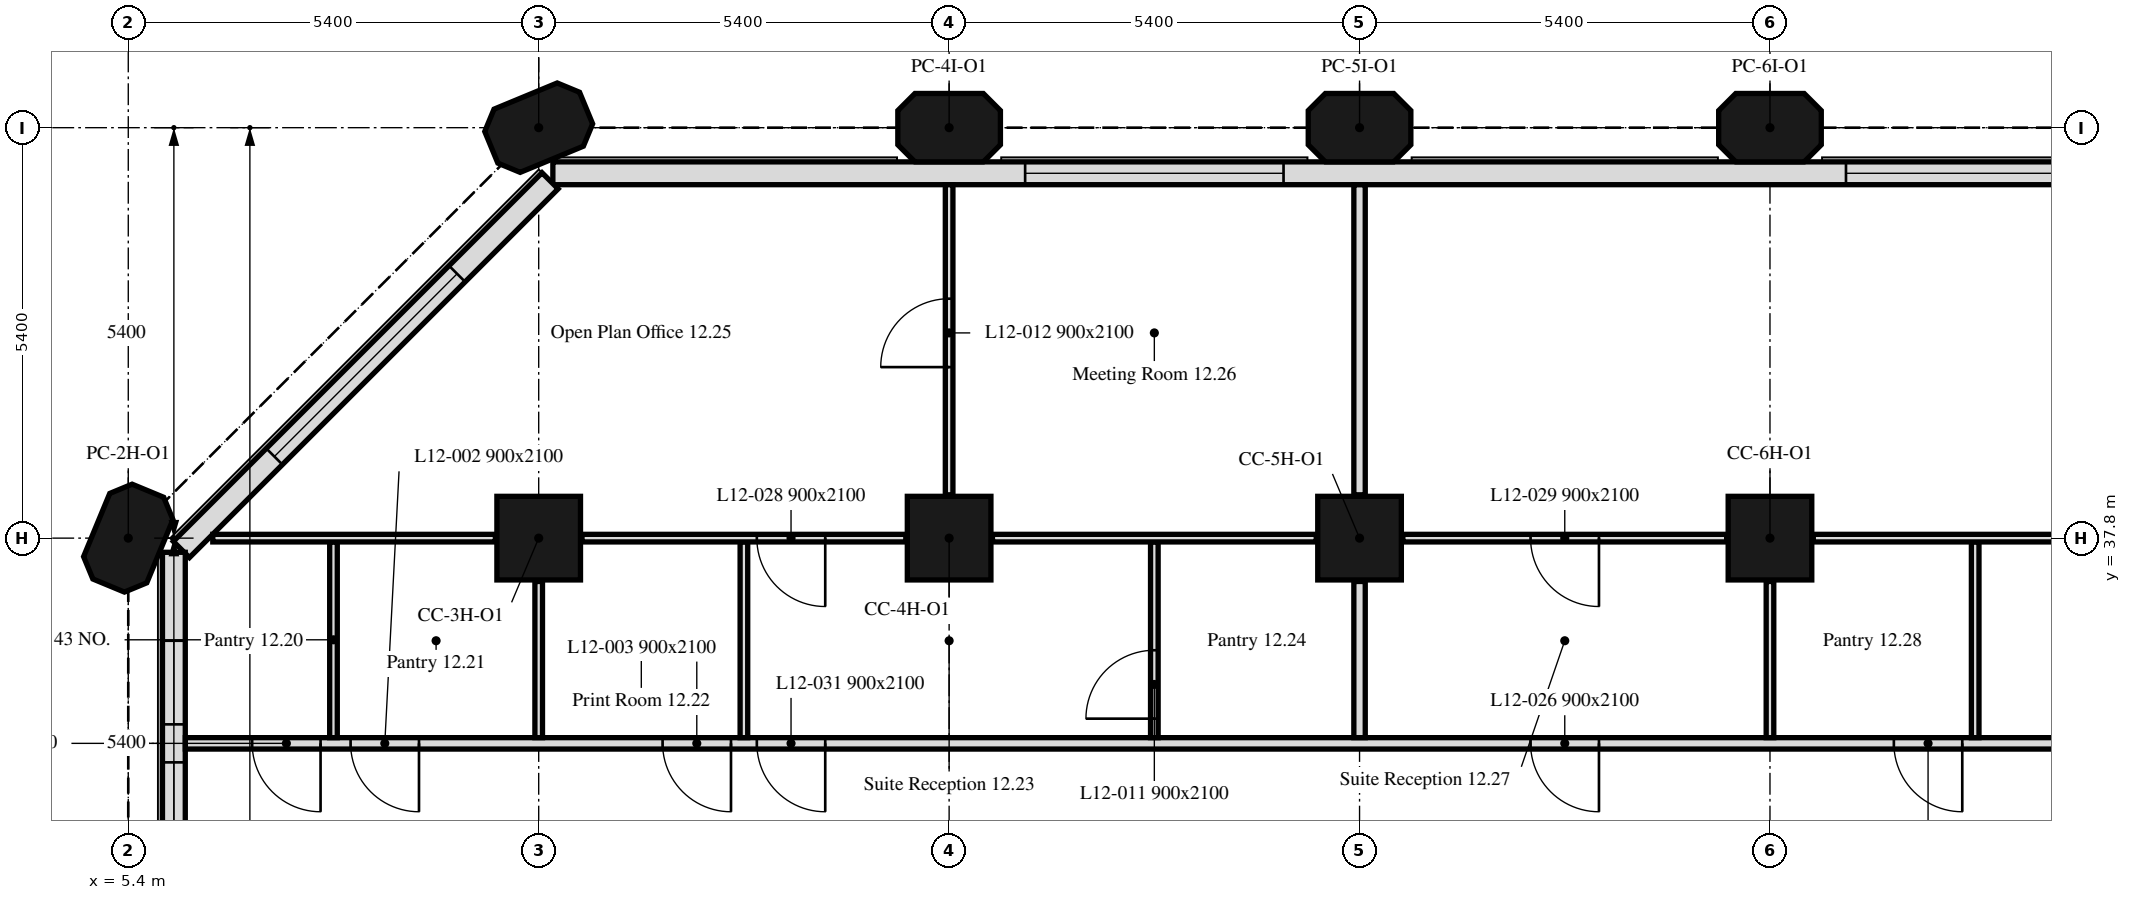
"""IFC4 building model, lengths in metres.
Left out: names, types, materials, properties, quantities, classifications, styles, units other than length and angle.
Written with IfcOpenShell. Run it as: python <this file> out.ifc"""

import sys

from ifc_helpers import new_model, si_unit, direction, frame, frame_2d, origin, origin_2d, place, context, subcontext, project, spatial, polyline, rectangle, outline, extrude, element, fill, save


model = new_model("IFC4")
c1 = context("Model", 3, precision=1e-05, world=origin(), true_north=direction((0.0, 1.0)))
c2 = subcontext(c1, "Body", "Model", "MODEL_VIEW")
j1 = project(units=[si_unit("LENGTHUNIT", "METRE"), si_unit("PLANEANGLEUNIT", "RADIAN")], contexts=[c1])
p1 = place(None, origin())
s1 = spatial("IfcSite", under=j1, at=p1, CompositionType="ELEMENT")
p2 = place(p1, origin())
s2 = spatial("IfcBuilding", under=s1, at=p2, CompositionType="ELEMENT")
p3 = place(p2, frame((0.0, 0.0, 56.4)))
s3 = spatial("IfcBuildingStorey", under=s2, at=p3, CompositionType="ELEMENT", Elevation=56.4)
p4 = place(p3, frame((5.4, 37.8, 0.0), z_axis=(0.0, 0.0, 1.0), x_axis=(0.382683432365, 0.923879532511, 0.0)))
e1 = element("IfcColumn", 1, at=p4, inside=s3, PredefinedType="COLUMN", context=c2, shape_type="SweptSolid", body=[
    extrude(outline(polyline([(-0.45, -0.45), (0.45, -0.45), (0.675, -0.225), (0.675, 0.225), (0.45, 0.45), (-0.45, 0.45), (-0.675, 0.225), (-0.675, -0.225), (-0.45, -0.45)])), origin(), (0.0, 0.0, 1.0), 3.3),
])
for number, where, z_axis, x_axis in (
    (2, (10.8, 37.8, 0.0), (0.0, 0.0, 1.0), (1.0, 0.0, 0.0)),
    (3, (16.2, 37.8, 0.0), (0.0, 0.0, 1.0), (1.0, 0.0, 0.0)),
    (4, (21.6, 37.8, 0.0), (0.0, 0.0, 1.0), (1.0, 0.0, 0.0)),
    (5, (27.0, 37.8, 0.0), (0.0, 0.0, 1.0), (1.0, 0.0, 0.0)),
):
    element("IfcColumn", number, at=place(p3, frame(where, z_axis=z_axis, x_axis=x_axis)), inside=s3, PredefinedType="COLUMN", context=c2, shape_type="SweptSolid", body=[
        extrude(rectangle(XDim=1.1, YDim=1.1, at=origin_2d()), origin(), (0.0, 0.0, 1.0), 3.3),
    ])
for number, where, z_axis, x_axis in (
    (6, (10.8, 43.2, 0.0), (0.0, 0.0, 1.0), (0.924, 0.383, 0.0)),
    (7, (16.2, 43.2, 0.0), (0.0, 0.0, 1.0), (1.0, 0.0, 0.0)),
    (8, (21.6, 43.2, 0.0), (0.0, 0.0, 1.0), (1.0, 0.0, 0.0)),
    (9, (27.0, 43.2, 0.0), (0.0, 0.0, 1.0), (1.0, 0.0, 0.0)),
):
    element("IfcColumn", number, at=place(p3, frame(where, z_axis=z_axis, x_axis=x_axis)), inside=s3, PredefinedType="COLUMN", context=c2, shape_type="SweptSolid", body=[
        extrude(outline(polyline([(-0.45, -0.45), (0.45, -0.45), (0.675, -0.225), (0.675, 0.225), (0.45, 0.45), (-0.45, 0.45), (-0.675, 0.225), (-0.675, -0.225), (-0.45, -0.45)])), origin(), (0.0, 0.0, 1.0), 3.3),
    ])
p5 = place(p3, frame((43.014, 42.6, 0.0), z_axis=(0.0, 0.0, 1.0), x_axis=(-1.0, 0.0, 0.0)))
e10 = element("IfcWall", 10, at=p5, inside=s3, PredefinedType="SOLIDWALL", context=c2, shape_type="SweptSolid", body=[
    extrude(rectangle(XDim=32.027, YDim=0.3, at=frame_2d((16.014, 0.0))), origin(), (0.0, 0.0, 1.0), 3.3),
])
p6 = place(p5, frame((0.814, 0.0, 0.9)))
e11 = element("IfcOpeningElement", 11, at=p6, cuts=e10, PredefinedType="OPENING", context=c2, shape_type="SweptSolid", body=[
    extrude(rectangle(XDim=3.4, YDim=1.7, at=frame_2d((1.7, 0.85))), frame((0.0, 0.16, 0.0), z_axis=(0.0, -1.0, 0.0), x_axis=(1.0, 0.0, 0.0)), (0.0, 0.0, 1.0), 0.32),
])
p7 = place(p5, frame((11.614, 0.0, 0.9)))
e12 = element("IfcOpeningElement", 12, at=p7, cuts=e10, PredefinedType="OPENING", context=c2, shape_type="SweptSolid", body=[
    extrude(rectangle(XDim=3.4, YDim=1.7, at=frame_2d((1.7, 0.85))), frame((0.0, 0.16, 0.0), z_axis=(0.0, -1.0, 0.0), x_axis=(1.0, 0.0, 0.0)), (0.0, 0.0, 1.0), 0.32),
])
p8 = place(p5, frame((22.414, 0.0, 0.9)))
e13 = element("IfcOpeningElement", 13, at=p8, cuts=e10, PredefinedType="OPENING", context=c2, shape_type="SweptSolid", body=[
    extrude(rectangle(XDim=3.4, YDim=1.7, at=frame_2d((1.7, 0.85))), frame((0.0, 0.16, 0.0), z_axis=(0.0, -1.0, 0.0), x_axis=(1.0, 0.0, 0.0)), (0.0, 0.0, 1.0), 0.32),
])
p9 = place(p3, frame((10.949, 42.501, 0.0), z_axis=(0.0, 0.0, 1.0), x_axis=(-0.707106781187, -0.707106781187, 0.0)))
e14 = element("IfcWall", 14, at=p9, inside=s3, PredefinedType="SOLIDWALL", context=c2, shape_type="SweptSolid", body=[
    extrude(rectangle(XDim=6.86, YDim=0.3, at=frame_2d((3.43, 0.0))), origin(), (0.0, 0.0, 1.0), 3.3),
])
p10 = place(p9, frame((1.73, 0.0, 0.9)))
e15 = element("IfcOpeningElement", 15, at=p10, cuts=e14, PredefinedType="OPENING", context=c2, shape_type="SweptSolid", body=[
    extrude(rectangle(XDim=3.4, YDim=1.7, at=frame_2d((1.7, 0.85))), frame((0.0, 0.16, 0.0), z_axis=(0.0, -1.0, 0.0), x_axis=(1.0, 0.0, 0.0)), (0.0, 0.0, 1.0), 0.32),
])
p11 = place(p3, frame((6.0, 37.614, 0.0), z_axis=(0.0, 0.0, 1.0), x_axis=(0.0, -1.0, 0.0)))
e16 = element("IfcWall", 16, at=p11, inside=s3, PredefinedType="SOLIDWALL", context=c2, shape_type="SweptSolid", body=[
    extrude(rectangle(XDim=5.214, YDim=0.3, at=frame_2d((2.607, 0.0))), origin(), (0.0, 0.0, 1.0), 3.3),
])
p12 = place(p11, frame((1.164, 0.0, 0.9)))
e17 = element("IfcOpeningElement", 17, at=p12, cuts=e16, PredefinedType="OPENING", context=c2, shape_type="SweptSolid", body=[
    extrude(rectangle(XDim=1.1, YDim=1.7, at=frame_2d((0.55, 0.85))), frame((0.0, 0.16, 0.0), z_axis=(0.0, -1.0, 0.0), x_axis=(1.0, 0.0, 0.0)), (0.0, 0.0, 1.0), 0.32),
])
p13 = place(p11, frame((2.764, 0.0, 0.9)))
e18 = element("IfcOpeningElement", 18, at=p13, cuts=e16, PredefinedType="OPENING", context=c2, shape_type="SweptSolid", body=[
    extrude(rectangle(XDim=1.1, YDim=1.7, at=frame_2d((0.55, 0.85))), frame((0.0, 0.16, 0.0), z_axis=(0.0, -1.0, 0.0), x_axis=(1.0, 0.0, 0.0)), (0.0, 0.0, 1.0), 0.32),
])
p14 = place(p3, frame((45.8, 35.1, 0.0), z_axis=(0.0, 0.0, 1.0), x_axis=(-1.0, 0.0, 0.0)))
e19 = element("IfcWall", 19, at=p14, inside=s3, PredefinedType="PARTITIONING", context=c2, shape_type="SweptSolid", body=[
    extrude(rectangle(XDim=39.649, YDim=0.15, at=frame_2d((19.825, 0.0))), origin(), (0.0, 0.0, 1.0), 3.3),
])
p15 = place(p14, frame((37.87, 0.0, 0.0)))
e20 = element("IfcOpeningElement", 20, at=p15, cuts=e19, PredefinedType="OPENING", context=c2, shape_type="SweptSolid", body=[
    extrude(rectangle(XDim=0.9, YDim=2.1, at=frame_2d((0.45, 1.05))), frame((0.0, 0.075, 0.0), z_axis=(0.0, -1.0, 0.0), x_axis=(1.0, 0.0, 0.0)), (0.0, 0.0, 1.0), 0.15),
])
p16 = place(p14, frame((36.575, 0.0, 0.0)))
e21 = element("IfcOpeningElement", 21, at=p16, cuts=e19, PredefinedType="OPENING", context=c2, shape_type="SweptSolid", body=[
    extrude(rectangle(XDim=0.9, YDim=2.1, at=frame_2d((0.45, 1.05))), frame((0.0, 0.075, 0.0), z_axis=(0.0, -1.0, 0.0), x_axis=(1.0, 0.0, 0.0)), (0.0, 0.0, 1.0), 0.15),
])
p17 = place(p14, frame((32.47, 0.0, 0.0)))
e22 = element("IfcOpeningElement", 22, at=p17, cuts=e19, PredefinedType="OPENING", context=c2, shape_type="SweptSolid", body=[
    extrude(rectangle(XDim=0.9, YDim=2.1, at=frame_2d((0.45, 1.05))), frame((0.0, 0.075, 0.0), z_axis=(0.0, -1.0, 0.0), x_axis=(1.0, 0.0, 0.0)), (0.0, 0.0, 1.0), 0.15),
])
p18 = place(p14, frame((16.27, 0.0, 0.0)))
e23 = element("IfcOpeningElement", 23, at=p18, cuts=e19, PredefinedType="OPENING", context=c2, shape_type="SweptSolid", body=[
    extrude(rectangle(XDim=0.9, YDim=2.1, at=frame_2d((0.45, 1.05))), frame((0.0, 0.075, 0.0), z_axis=(0.0, -1.0, 0.0), x_axis=(1.0, 0.0, 0.0)), (0.0, 0.0, 1.0), 0.15),
])
p19 = place(p14, frame((21.05, 0.0, 0.0)))
e24 = element("IfcOpeningElement", 24, at=p19, cuts=e19, PredefinedType="OPENING", context=c2, shape_type="SweptSolid", body=[
    extrude(rectangle(XDim=0.9, YDim=2.1, at=frame_2d((0.45, 1.05))), frame((0.0, 0.075, 0.0), z_axis=(0.0, -1.0, 0.0), x_axis=(1.0, 0.0, 0.0)), (0.0, 0.0, 1.0), 0.15),
])
p20 = place(p14, frame((31.23, 0.0, 0.0)))
e25 = element("IfcOpeningElement", 25, at=p20, cuts=e19, PredefinedType="OPENING", context=c2, shape_type="SweptSolid", body=[
    extrude(rectangle(XDim=0.9, YDim=2.1, at=frame_2d((0.45, 1.05))), frame((0.0, 0.075, 0.0), z_axis=(0.0, -1.0, 0.0), x_axis=(1.0, 0.0, 0.0)), (0.0, 0.0, 1.0), 0.15),
])
p21 = place(p3, frame((8.1, 35.175, 0.0), z_axis=(0.0, 0.0, 1.0), x_axis=(0.0, 1.0, 0.0)))
e26 = element("IfcWall", 26, at=p21, inside=s3, PredefinedType="PARTITIONING", context=c2, shape_type="SweptSolid", body=[
    extrude(rectangle(XDim=2.575, YDim=0.1, at=frame_2d((1.288, 0.0))), origin(), (0.0, 0.0, 1.0), 3.3),
])
p22 = place(p3, frame((10.8, 35.175, 0.0), z_axis=(0.0, 0.0, 1.0), x_axis=(0.0, 1.0, 0.0)))
e27 = element("IfcWall", 27, at=p22, inside=s3, PredefinedType="PARTITIONING", context=c2, shape_type="SweptSolid", body=[
    extrude(rectangle(XDim=2.055, YDim=0.1, at=frame_2d((1.027, 0.0))), origin(), (0.0, 0.0, 1.0), 3.3),
])
p23 = place(p3, frame((10.23, 37.8, 0.0), z_axis=(0.0, 0.0, 1.0), x_axis=(-1.0, 0.0, 0.0)))
e28 = element("IfcWall", 28, at=p23, inside=s3, PredefinedType="PARTITIONING", context=c2, shape_type="SweptSolid", body=[
    extrude(rectangle(XDim=3.718, YDim=0.1, at=frame_2d((1.859, 0.0))), origin(), (0.0, 0.0, 1.0), 3.3),
])
p24 = place(p3, frame((13.5, 35.175, 0.0), z_axis=(0.0, 0.0, 1.0), x_axis=(0.0, 1.0, 0.0)))
e29 = element("IfcWall", 29, at=p24, inside=s3, PredefinedType="PARTITIONING", context=c2, shape_type="SweptSolid", body=[
    extrude(rectangle(XDim=2.575, YDim=0.1, at=frame_2d((1.288, 0.0))), origin(), (0.0, 0.0, 1.0), 3.3),
])
p25 = place(p3, frame((18.9, 35.175, 0.0), z_axis=(0.0, 0.0, 1.0), x_axis=(0.0, 1.0, 0.0)))
e30 = element("IfcWall", 30, at=p25, inside=s3, PredefinedType="PARTITIONING", context=c2, shape_type="SweptSolid", body=[
    extrude(rectangle(XDim=2.575, YDim=0.1, at=frame_2d((1.288, 0.0))), origin(), (0.0, 0.0, 1.0), 3.3),
])
p26 = place(p25, frame((0.25, 0.0, 0.0)))
e31 = element("IfcOpeningElement", 31, at=p26, cuts=e30, PredefinedType="OPENING", context=c2, shape_type="SweptSolid", body=[
    extrude(rectangle(XDim=0.9, YDim=2.1, at=frame_2d((0.45, 1.05))), frame((0.0, 0.05, 0.0), z_axis=(0.0, -1.0, 0.0), x_axis=(1.0, 0.0, 0.0)), (0.0, 0.0, 1.0), 0.1),
])
p27 = place(p3, frame((15.63, 37.8, 0.0), z_axis=(0.0, 0.0, 1.0), x_axis=(-1.0, 0.0, 0.0)))
e32 = element("IfcWall", 32, at=p27, inside=s3, PredefinedType="PARTITIONING", context=c2, shape_type="SweptSolid", body=[
    extrude(rectangle(XDim=4.26, YDim=0.1, at=frame_2d((2.13, 0.0))), origin(), (0.0, 0.0, 1.0), 3.3),
])
p28 = place(p27, frame((1.06, 0.0, 0.0)))
e33 = element("IfcOpeningElement", 33, at=p28, cuts=e32, PredefinedType="OPENING", context=c2, shape_type="SweptSolid", body=[
    extrude(rectangle(XDim=0.9, YDim=2.1, at=frame_2d((0.45, 1.05))), frame((0.0, 0.05, 0.0), z_axis=(0.0, -1.0, 0.0), x_axis=(1.0, 0.0, 0.0)), (0.0, 0.0, 1.0), 0.1),
])
p29 = place(p3, frame((21.6, 35.175, 0.0), z_axis=(0.0, 0.0, 1.0), x_axis=(0.0, 1.0, 0.0)))
e34 = element("IfcWall", 34, at=p29, inside=s3, PredefinedType="PARTITIONING", context=c2, shape_type="SweptSolid", body=[
    extrude(rectangle(XDim=2.055, YDim=0.15, at=frame_2d((1.027, 0.0))), origin(), (0.0, 0.0, 1.0), 3.3),
])
p30 = place(p3, frame((21.03, 37.8, 0.0), z_axis=(0.0, 0.0, 1.0), x_axis=(-1.0, 0.0, 0.0)))
e35 = element("IfcWall", 35, at=p30, inside=s3, PredefinedType="PARTITIONING", context=c2, shape_type="SweptSolid", body=[
    extrude(rectangle(XDim=4.26, YDim=0.1, at=frame_2d((2.13, 0.0))), origin(), (0.0, 0.0, 1.0), 3.3),
])
p31 = place(p3, frame((16.2, 38.37, 0.0), z_axis=(0.0, 0.0, 1.0), x_axis=(0.0, 1.0, 0.0)))
e36 = element("IfcWall", 36, at=p31, inside=s3, PredefinedType="PARTITIONING", context=c2, shape_type="SweptSolid", body=[
    extrude(rectangle(XDim=4.079, YDim=0.1, at=frame_2d((2.04, 0.0))), origin(), (0.0, 0.0, 1.0), 3.3),
])
p32 = place(p31, frame((1.68, 0.0, 0.0)))
e37 = element("IfcOpeningElement", 37, at=p32, cuts=e36, PredefinedType="OPENING", context=c2, shape_type="SweptSolid", body=[
    extrude(rectangle(XDim=0.9, YDim=2.1, at=frame_2d((0.45, 1.05))), frame((0.0, 0.05, 0.0), z_axis=(0.0, -1.0, 0.0), x_axis=(1.0, 0.0, 0.0)), (0.0, 0.0, 1.0), 0.1),
])
p33 = place(p3, frame((21.6, 38.37, 0.0), z_axis=(0.0, 0.0, 1.0), x_axis=(0.0, 1.0, 0.0)))
e38 = element("IfcWall", 38, at=p33, inside=s3, PredefinedType="PARTITIONING", context=c2, shape_type="SweptSolid", body=[
    extrude(rectangle(XDim=4.079, YDim=0.15, at=frame_2d((2.04, 0.0))), origin(), (0.0, 0.0, 1.0), 3.3),
])
p34 = place(p3, frame((27.0, 35.175, 0.0), z_axis=(0.0, 0.0, 1.0), x_axis=(0.0, 1.0, 0.0)))
e39 = element("IfcWall", 39, at=p34, inside=s3, PredefinedType="PARTITIONING", context=c2, shape_type="SweptSolid", body=[
    extrude(rectangle(XDim=2.055, YDim=0.1, at=frame_2d((1.027, 0.0))), origin(), (0.0, 0.0, 1.0), 3.3),
])
p35 = place(p3, frame((26.43, 37.8, 0.0), z_axis=(0.0, 0.0, 1.0), x_axis=(-1.0, 0.0, 0.0)))
e40 = element("IfcWall", 40, at=p35, inside=s3, PredefinedType="PARTITIONING", context=c2, shape_type="SweptSolid", body=[
    extrude(rectangle(XDim=4.26, YDim=0.1, at=frame_2d((2.13, 0.0))), origin(), (0.0, 0.0, 1.0), 3.3),
])
p36 = place(p35, frame((1.68, 0.0, 0.0)))
e41 = element("IfcOpeningElement", 41, at=p36, cuts=e40, PredefinedType="OPENING", context=c2, shape_type="SweptSolid", body=[
    extrude(rectangle(XDim=0.9, YDim=2.1, at=frame_2d((0.45, 1.05))), frame((0.0, 0.05, 0.0), z_axis=(0.0, -1.0, 0.0), x_axis=(1.0, 0.0, 0.0)), (0.0, 0.0, 1.0), 0.1),
])
p37 = place(p3, frame((29.7, 35.175, 0.0), z_axis=(0.0, 0.0, 1.0), x_axis=(0.0, 1.0, 0.0)))
e42 = element("IfcWall", 42, at=p37, inside=s3, PredefinedType="PARTITIONING", context=c2, shape_type="SweptSolid", body=[
    extrude(rectangle(XDim=2.575, YDim=0.1, at=frame_2d((1.288, 0.0))), origin(), (0.0, 0.0, 1.0), 3.3),
])
p38 = place(p3, frame((31.83, 37.8, 0.0), z_axis=(0.0, 0.0, 1.0), x_axis=(-1.0, 0.0, 0.0)))
e43 = element("IfcWall", 43, at=p38, inside=s3, PredefinedType="PARTITIONING", context=c2, shape_type="SweptSolid", body=[
    extrude(rectangle(XDim=4.26, YDim=0.1, at=frame_2d((2.13, 0.0))), origin(), (0.0, 0.0, 1.0), 3.3),
])
p39 = place(p7, origin())
e44 = element("IfcWindow", 44, at=p39, inside=s3, PartitioningType="SINGLE_PANEL", PredefinedType="WINDOW", context=c2, shape_type="SweptSolid", body=[
    extrude(rectangle(XDim=3.4, YDim=1.7, at=frame_2d((1.7, 0.85))), frame((0.0, 0.03, 0.0), z_axis=(0.0, -1.0, 0.0), x_axis=(1.0, 0.0, 0.0)), (0.0, 0.0, 1.0), 0.06),
])
fill(e12, e44)
p40 = place(p8, origin())
e45 = element("IfcWindow", 45, at=p40, inside=s3, PartitioningType="SINGLE_PANEL", PredefinedType="WINDOW", context=c2, shape_type="SweptSolid", body=[
    extrude(rectangle(XDim=3.4, YDim=1.7, at=frame_2d((1.7, 0.85))), frame((0.0, 0.03, 0.0), z_axis=(0.0, -1.0, 0.0), x_axis=(1.0, 0.0, 0.0)), (0.0, 0.0, 1.0), 0.06),
])
fill(e13, e45)
p41 = place(p10, origin())
e46 = element("IfcWindow", 46, at=p41, inside=s3, PartitioningType="SINGLE_PANEL", PredefinedType="WINDOW", context=c2, shape_type="SweptSolid", body=[
    extrude(rectangle(XDim=3.4, YDim=1.7, at=frame_2d((1.7, 0.85))), frame((0.0, 0.03, 0.0), z_axis=(0.0, -1.0, 0.0), x_axis=(1.0, 0.0, 0.0)), (0.0, 0.0, 1.0), 0.06),
])
fill(e15, e46)
p42 = place(p12, origin())
e47 = element("IfcWindow", 47, at=p42, inside=s3, PartitioningType="SINGLE_PANEL", PredefinedType="WINDOW", context=c2, shape_type="SweptSolid", body=[
    extrude(rectangle(XDim=1.1, YDim=1.7, at=frame_2d((0.55, 0.85))), frame((0.0, 0.03, 0.0), z_axis=(0.0, -1.0, 0.0), x_axis=(1.0, 0.0, 0.0)), (0.0, 0.0, 1.0), 0.06),
])
fill(e17, e47)
p43 = place(p13, origin())
e48 = element("IfcWindow", 48, at=p43, inside=s3, PartitioningType="SINGLE_PANEL", PredefinedType="WINDOW", context=c2, shape_type="SweptSolid", body=[
    extrude(rectangle(XDim=1.1, YDim=1.7, at=frame_2d((0.55, 0.85))), frame((0.0, 0.03, 0.0), z_axis=(0.0, -1.0, 0.0), x_axis=(1.0, 0.0, 0.0)), (0.0, 0.0, 1.0), 0.06),
])
fill(e18, e48)
p44 = place(p15, origin())
e49 = element("IfcDoor", 49, at=p44, inside=s3, OperationType="SINGLE_SWING_LEFT", PredefinedType="DOOR", context=c2, shape_type="SweptSolid", body=[
    extrude(rectangle(XDim=0.9, YDim=2.1, at=frame_2d((0.45, 1.05))), frame((0.0, 0.025, 0.0), z_axis=(0.0, -1.0, 0.0), x_axis=(1.0, 0.0, 0.0)), (0.0, 0.0, 1.0), 0.05),
])
fill(e20, e49)
p45 = place(p16, origin())
e50 = element("IfcDoor", 50, at=p45, inside=s3, OperationType="SINGLE_SWING_LEFT", PredefinedType="DOOR", context=c2, shape_type="SweptSolid", body=[
    extrude(rectangle(XDim=0.9, YDim=2.1, at=frame_2d((0.45, 1.05))), frame((0.0, 0.025, 0.0), z_axis=(0.0, -1.0, 0.0), x_axis=(1.0, 0.0, 0.0)), (0.0, 0.0, 1.0), 0.05),
])
fill(e21, e50)
p46 = place(p17, origin())
e51 = element("IfcDoor", 51, at=p46, inside=s3, OperationType="SINGLE_SWING_LEFT", PredefinedType="DOOR", context=c2, shape_type="SweptSolid", body=[
    extrude(rectangle(XDim=0.9, YDim=2.1, at=frame_2d((0.45, 1.05))), frame((0.0, 0.025, 0.0), z_axis=(0.0, -1.0, 0.0), x_axis=(1.0, 0.0, 0.0)), (0.0, 0.0, 1.0), 0.05),
])
fill(e22, e51)
p47 = place(p18, origin())
e52 = element("IfcDoor", 52, at=p47, inside=s3, OperationType="SINGLE_SWING_LEFT", PredefinedType="DOOR", context=c2, shape_type="SweptSolid", body=[
    extrude(rectangle(XDim=0.9, YDim=2.1, at=frame_2d((0.45, 1.05))), frame((0.0, 0.025, 0.0), z_axis=(0.0, -1.0, 0.0), x_axis=(1.0, 0.0, 0.0)), (0.0, 0.0, 1.0), 0.05),
])
fill(e23, e52)
p48 = place(p26, origin())
e53 = element("IfcDoor", 53, at=p48, inside=s3, OperationType="SINGLE_SWING_LEFT", PredefinedType="DOOR", context=c2, shape_type="SweptSolid", body=[
    extrude(rectangle(XDim=0.9, YDim=2.1, at=frame_2d((0.45, 1.05))), frame((0.0, 0.025, 0.0), z_axis=(0.0, -1.0, 0.0), x_axis=(1.0, 0.0, 0.0)), (0.0, 0.0, 1.0), 0.05),
])
fill(e31, e53)
p49 = place(p32, origin())
e54 = element("IfcDoor", 54, at=p49, inside=s3, OperationType="SINGLE_SWING_LEFT", PredefinedType="DOOR", context=c2, shape_type="SweptSolid", body=[
    extrude(rectangle(XDim=0.9, YDim=2.1, at=frame_2d((0.45, 1.05))), frame((0.0, 0.025, 0.0), z_axis=(0.0, -1.0, 0.0), x_axis=(1.0, 0.0, 0.0)), (0.0, 0.0, 1.0), 0.05),
])
fill(e37, e54)
p50 = place(p19, origin())
e55 = element("IfcDoor", 55, at=p50, inside=s3, OperationType="SINGLE_SWING_LEFT", PredefinedType="DOOR", context=c2, shape_type="SweptSolid", body=[
    extrude(rectangle(XDim=0.9, YDim=2.1, at=frame_2d((0.45, 1.05))), frame((0.0, 0.025, 0.0), z_axis=(0.0, -1.0, 0.0), x_axis=(1.0, 0.0, 0.0)), (0.0, 0.0, 1.0), 0.05),
])
fill(e24, e55)
p51 = place(p28, origin())
e56 = element("IfcDoor", 56, at=p51, inside=s3, OperationType="SINGLE_SWING_LEFT", PredefinedType="DOOR", context=c2, shape_type="SweptSolid", body=[
    extrude(rectangle(XDim=0.9, YDim=2.1, at=frame_2d((0.45, 1.05))), frame((0.0, 0.025, 0.0), z_axis=(0.0, -1.0, 0.0), x_axis=(1.0, 0.0, 0.0)), (0.0, 0.0, 1.0), 0.05),
])
fill(e33, e56)
p52 = place(p36, origin())
e57 = element("IfcDoor", 57, at=p52, inside=s3, OperationType="SINGLE_SWING_RIGHT", PredefinedType="DOOR", context=c2, shape_type="SweptSolid", body=[
    extrude(rectangle(XDim=0.9, YDim=2.1, at=frame_2d((0.45, 1.05))), frame((0.0, 0.025, 0.0), z_axis=(0.0, -1.0, 0.0), x_axis=(1.0, 0.0, 0.0)), (0.0, 0.0, 1.0), 0.05),
])
fill(e41, e57)
p53 = place(p20, origin())
e58 = element("IfcDoor", 58, at=p53, inside=s3, OperationType="SINGLE_SWING_LEFT", PredefinedType="DOOR", context=c2, shape_type="SweptSolid", body=[
    extrude(rectangle(XDim=0.9, YDim=2.1, at=frame_2d((0.45, 1.05))), frame((0.0, 0.025, 0.0), z_axis=(0.0, -1.0, 0.0), x_axis=(1.0, 0.0, 0.0)), (0.0, 0.0, 1.0), 0.05),
])
fill(e25, e58)
save(model, sys.argv[1])
